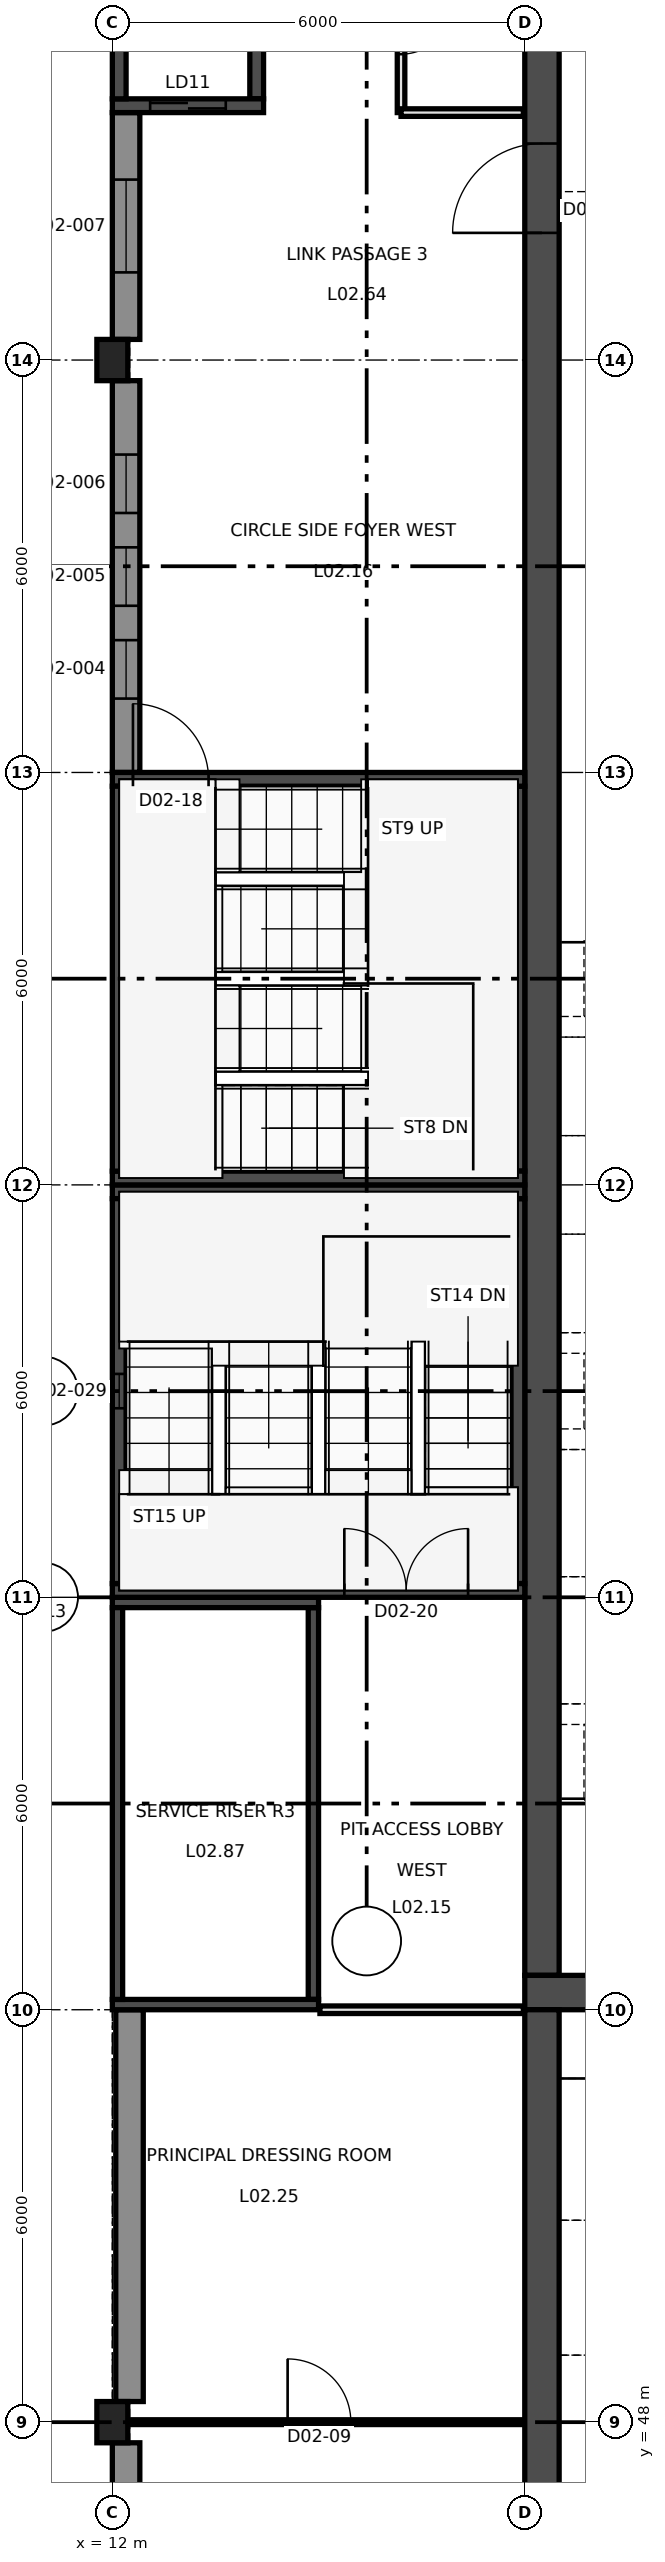
"""IFC4 building model, lengths in metres.
Left out: names, types, materials, properties, quantities, classifications, styles, units other than length and angle.
Written with IfcOpenShell. Run it as: python <this file> out.ifc"""

import sys

from ifc_helpers import new_model, si_unit, direction, frame, frame_2d, origin, origin_2d, place, context, subcontext, project, spatial, rectangle, extrude, element, fill, save


model = new_model("IFC4")
c1 = context("Model", 3, precision=1e-05, world=origin(), true_north=direction((0.0, 1.0)))
c2 = subcontext(c1, "Body", "Model", "MODEL_VIEW")
j1 = project(units=[si_unit("LENGTHUNIT", "METRE"), si_unit("PLANEANGLEUNIT", "RADIAN")], contexts=[c1])
p1 = place(None, origin())
s1 = spatial("IfcSite", under=j1, at=p1, CompositionType="ELEMENT")
p2 = place(p1, origin())
s2 = spatial("IfcBuilding", under=s1, at=p2, CompositionType="ELEMENT")
p3 = place(p2, frame((0.0, 0.0, 12.0)))
s3 = spatial("IfcBuildingStorey", under=s2, at=p3, CompositionType="ELEMENT", Elevation=12.0)
for number, where, z_axis, x_axis in (
    (1, (12.0, 48.0, 0.0), (0.0, 0.0, 1.0), (1.0, 0.0, 0.0)),
    (2, (12.0, 78.0, 0.0), (0.0, 0.0, 1.0), (1.0, 0.0, 0.0)),
):
    element("IfcColumn", number, at=place(p3, frame(where, z_axis=z_axis, x_axis=x_axis)), inside=s3, PredefinedType="COLUMN", context=c2, shape_type="SweptSolid", body=[
        extrude(rectangle(XDim=0.45, YDim=0.6, at=origin_2d()), origin(), (0.0, 0.0, 1.0), 4.5),
    ])
p4 = place(p3, frame((12.0, 71.9, 0.0), z_axis=(0.0, 0.0, 1.0), x_axis=(1.0, 0.0, 0.0)))
e3 = element("IfcWall", 3, at=p4, inside=s3, PredefinedType="SHEAR", context=c2, shape_type="SweptSolid", body=[
    extrude(rectangle(XDim=6.0, YDim=0.2, at=frame_2d((3.0, 0.0))), origin(), (0.0, 0.0, 1.0), 4.5),
])
p5 = place(p4, frame((0.3, 0.0, 0.0)))
e4 = element("IfcOpeningElement", 4, at=p5, cuts=e3, PredefinedType="OPENING", context=c2, shape_type="SweptSolid", body=[
    extrude(rectangle(XDim=1.1, YDim=2.2, at=frame_2d((0.55, 1.1))), frame((0.0, 0.11, 0.0), z_axis=(0.0, -1.0, 0.0), x_axis=(1.0, 0.0, 0.0)), (0.0, 0.0, 1.0), 0.22),
])
p6 = place(p3, frame((12.0, 66.1, 0.0), z_axis=(0.0, 0.0, 1.0), x_axis=(1.0, 0.0, 0.0)))
e5 = element("IfcWall", 5, at=p6, inside=s3, PredefinedType="SHEAR", context=c2, shape_type="SweptSolid", body=[
    extrude(rectangle(XDim=6.0, YDim=0.2, at=frame_2d((3.0, 0.0))), origin(), (0.0, 0.0, 1.0), 4.5),
])
for number, where, z_axis, x_axis in (
    (6, (12.1, 66.2, 0.0), (0.0, 0.0, 1.0), (0.0, 1.0, 0.0)),
    (7, (17.9, 66.2, 0.0), (0.0, 0.0, 1.0), (0.0, 1.0, 0.0)),
):
    element("IfcWall", number, at=place(p3, frame(where, z_axis=z_axis, x_axis=x_axis)), inside=s3, PredefinedType="SHEAR", context=c2, shape_type="SweptSolid", body=[
        extrude(rectangle(XDim=5.6, YDim=0.2, at=frame_2d((2.8, 0.0))), origin(), (0.0, 0.0, 1.0), 4.5),
    ])
p7 = place(p3, frame((12.0, 65.9, 0.0), z_axis=(0.0, 0.0, 1.0), x_axis=(1.0, 0.0, 0.0)))
e8 = element("IfcWall", 8, at=p7, inside=s3, PredefinedType="SHEAR", context=c2, shape_type="SweptSolid", body=[
    extrude(rectangle(XDim=6.0, YDim=0.2, at=frame_2d((3.0, 0.0))), origin(), (0.0, 0.0, 1.0), 4.5),
])
p8 = place(p3, frame((12.0, 60.1, 0.0), z_axis=(0.0, 0.0, 1.0), x_axis=(1.0, 0.0, 0.0)))
e9 = element("IfcWall", 9, at=p8, inside=s3, PredefinedType="SHEAR", context=c2, shape_type="SweptSolid", body=[
    extrude(rectangle(XDim=6.0, YDim=0.2, at=frame_2d((3.0, 0.0))), origin(), (0.0, 0.0, 1.0), 4.5),
])
p9 = place(p8, frame((3.375, 0.0, 0.0)))
e10 = element("IfcOpeningElement", 10, at=p9, cuts=e9, PredefinedType="OPENING", context=c2, shape_type="SweptSolid", body=[
    extrude(rectangle(XDim=1.8, YDim=2.2, at=frame_2d((0.9, 1.1))), frame((0.0, 0.11, 0.0), z_axis=(0.0, -1.0, 0.0), x_axis=(1.0, 0.0, 0.0)), (0.0, 0.0, 1.0), 0.22),
])
p10 = place(p3, frame((12.1, 60.2, 0.0), z_axis=(0.0, 0.0, 1.0), x_axis=(0.0, 1.0, 0.0)))
e11 = element("IfcWall", 11, at=p10, inside=s3, PredefinedType="SHEAR", context=c2, shape_type="SweptSolid", body=[
    extrude(rectangle(XDim=5.6, YDim=0.2, at=frame_2d((2.8, 0.0))), origin(), (0.0, 0.0, 1.0), 4.5),
])
p11 = place(p10, frame((2.55, 0.0, 0.9)))
e12 = element("IfcOpeningElement", 12, at=p11, cuts=e11, PredefinedType="OPENING", context=c2, shape_type="SweptSolid", body=[
    extrude(rectangle(XDim=0.5, YDim=2.1, at=frame_2d((0.25, 1.05))), frame((0.0, 0.11, 0.0), z_axis=(0.0, -1.0, 0.0), x_axis=(1.0, 0.0, 0.0)), (0.0, 0.0, 1.0), 0.22),
])
p12 = place(p3, frame((17.9, 60.2, 0.0), z_axis=(0.0, 0.0, 1.0), x_axis=(0.0, 1.0, 0.0)))
e13 = element("IfcWall", 13, at=p12, inside=s3, PredefinedType="SHEAR", context=c2, shape_type="SweptSolid", body=[
    extrude(rectangle(XDim=5.6, YDim=0.2, at=frame_2d((2.8, 0.0))), origin(), (0.0, 0.0, 1.0), 4.5),
])
p13 = place(p3, frame((12.0, 81.7, 0.0), z_axis=(0.0, 0.0, 1.0), x_axis=(1.0, 0.0, 0.0)))
e14 = element("IfcWall", 14, at=p13, inside=s3, PredefinedType="SHEAR", context=c2, shape_type="SweptSolid", body=[
    extrude(rectangle(XDim=2.2, YDim=0.2, at=frame_2d((1.1, 0.0))), origin(), (0.0, 0.0, 1.0), 4.5),
])
p14 = place(p13, frame((0.55, 0.0, 0.0)))
e15 = element("IfcOpeningElement", 15, at=p14, cuts=e14, PredefinedType="OPENING", context=c2, shape_type="SweptSolid", body=[
    extrude(rectangle(XDim=1.1, YDim=2.1, at=frame_2d((0.55, 1.05))), frame((0.0, 0.11, 0.0), z_axis=(0.0, -1.0, 0.0), x_axis=(1.0, 0.0, 0.0)), (0.0, 0.0, 1.0), 0.22),
])
for number, where, z_axis, x_axis in (
    (16, (12.1, 81.8, 0.0), (0.0, 0.0, 1.0), (0.0, 1.0, 0.0)),
    (17, (14.1, 81.8, 0.0), (0.0, 0.0, 1.0), (0.0, 1.0, 0.0)),
):
    element("IfcWall", number, at=place(p3, frame(where, z_axis=z_axis, x_axis=x_axis)), inside=s3, PredefinedType="SHEAR", context=c2, shape_type="SweptSolid", body=[
        extrude(rectangle(XDim=2.0, YDim=0.2, at=frame_2d((1.0, 0.0))), origin(), (0.0, 0.0, 1.0), 4.5),
    ])
for number, where, z_axis, x_axis in (
    (18, (12.0, 59.925, 0.0), (0.0, 0.0, 1.0), (1.0, 0.0, 0.0)),
    (19, (12.0, 54.075, 0.0), (0.0, 0.0, 1.0), (1.0, 0.0, 0.0)),
):
    element("IfcWall", number, at=place(p3, frame(where, z_axis=z_axis, x_axis=x_axis)), inside=s3, PredefinedType="SHEAR", context=c2, shape_type="SweptSolid", body=[
        extrude(rectangle(XDim=3.0, YDim=0.15, at=frame_2d((1.5, 0.0))), origin(), (0.0, 0.0, 1.0), 4.5),
    ])
for number, where, z_axis, x_axis in (
    (20, (12.075, 54.15, 0.0), (0.0, 0.0, 1.0), (0.0, 1.0, 0.0)),
    (21, (14.925, 54.15, 0.0), (0.0, 0.0, 1.0), (0.0, 1.0, 0.0)),
):
    element("IfcWall", number, at=place(p3, frame(where, z_axis=z_axis, x_axis=x_axis)), inside=s3, PredefinedType="SHEAR", context=c2, shape_type="SweptSolid", body=[
        extrude(rectangle(XDim=5.7, YDim=0.15, at=frame_2d((2.85, 0.0))), origin(), (0.0, 0.0, 1.0), 4.5),
    ])
p15 = place(p3, frame((18.25, 54.5, 0.0), z_axis=(0.0, 0.0, 1.0), x_axis=(0.0, 1.0, 0.0)))
e22 = element("IfcWall", 22, at=p15, inside=s3, PredefinedType="SHEAR", context=c2, shape_type="SweptSolid", body=[
    extrude(rectangle(XDim=35.5, YDim=0.5, at=frame_2d((17.75, 0.0))), origin(), (0.0, 0.0, 1.0), 4.5),
])
p16 = place(p15, frame((25.35, 0.0, 0.0)))
e23 = element("IfcOpeningElement", 23, at=p16, cuts=e22, PredefinedType="OPENING", context=c2, shape_type="SweptSolid", body=[
    extrude(rectangle(XDim=1.3, YDim=2.1, at=frame_2d((0.65, 1.05))), frame((0.0, 0.26, 0.0), z_axis=(0.0, -1.0, 0.0), x_axis=(1.0, 0.0, 0.0)), (0.0, 0.0, 1.0), 0.52),
])
p17 = place(p3, frame((18.25, 30.0, 0.0), z_axis=(0.0, 0.0, 1.0), x_axis=(0.0, 1.0, 0.0)))
e24 = element("IfcWall", 24, at=p17, inside=s3, PredefinedType="SHEAR", context=c2, shape_type="SweptSolid", body=[
    extrude(rectangle(XDim=24.0, YDim=0.5, at=frame_2d((12.0, 0.0))), origin(), (0.0, 0.0, 1.0), 4.5),
])
p18 = place(p3, frame((18.0, 54.25, 0.0), z_axis=(0.0, 0.0, 1.0), x_axis=(1.0, 0.0, 0.0)))
e25 = element("IfcWall", 25, at=p18, inside=s3, PredefinedType="SHEAR", context=c2, shape_type="SweptSolid", body=[
    extrude(rectangle(XDim=8.0, YDim=0.5, at=frame_2d((4.0, 0.0))), origin(), (0.0, 0.0, 1.0), 4.5),
])
p19 = place(p3, frame((12.2, 42.0, 0.0), z_axis=(0.0, 0.0, 1.0), x_axis=(0.0, 1.0, 0.0)))
e26 = element("IfcWall", 26, at=p19, inside=s3, PredefinedType="SOLIDWALL", context=c2, shape_type="SweptSolid", body=[
    extrude(rectangle(XDim=5.7, YDim=0.4, at=frame_2d((2.85, 0.0))), origin(), (0.0, 0.0, 1.0), 3.55),
])
p20 = place(p19, frame((1.075, 0.0, 0.9)))
e27 = element("IfcOpeningElement", 27, at=p20, cuts=e26, PredefinedType="OPENING", context=c2, shape_type="SweptSolid", body=[
    extrude(rectangle(XDim=0.85, YDim=2.45, at=frame_2d((0.425, 1.225))), frame((0.0, 0.21, 0.0), z_axis=(0.0, -1.0, 0.0), x_axis=(1.0, 0.0, 0.0)), (0.0, 0.0, 1.0), 0.42),
])
p21 = place(p19, frame((2.425, 0.0, 0.9)))
e28 = element("IfcOpeningElement", 28, at=p21, cuts=e26, PredefinedType="OPENING", context=c2, shape_type="SweptSolid", body=[
    extrude(rectangle(XDim=0.85, YDim=2.45, at=frame_2d((0.425, 1.225))), frame((0.0, 0.21, 0.0), z_axis=(0.0, -1.0, 0.0), x_axis=(1.0, 0.0, 0.0)), (0.0, 0.0, 1.0), 0.42),
])
p22 = place(p19, frame((3.775, 0.0, 0.9)))
e29 = element("IfcOpeningElement", 29, at=p22, cuts=e26, PredefinedType="OPENING", context=c2, shape_type="SweptSolid", body=[
    extrude(rectangle(XDim=0.85, YDim=2.45, at=frame_2d((0.425, 1.225))), frame((0.0, 0.21, 0.0), z_axis=(0.0, -1.0, 0.0), x_axis=(1.0, 0.0, 0.0)), (0.0, 0.0, 1.0), 0.42),
])
p23 = place(p3, frame((12.25, 48.3, 0.0), z_axis=(0.0, 0.0, 1.0), x_axis=(0.0, 1.0, 0.0)))
e30 = element("IfcWall", 30, at=p23, inside=s3, PredefinedType="SOLIDWALL", context=c2, shape_type="SweptSolid", body=[
    extrude(rectangle(XDim=5.7, YDim=0.4, at=frame_2d((2.85, 0.0))), origin(), (0.0, 0.0, 1.0), 3.55),
])
p24 = place(p3, frame((12.2, 72.0, 0.0), z_axis=(0.0, 0.0, 1.0), x_axis=(0.0, 1.0, 0.0)))
e31 = element("IfcWall", 31, at=p24, inside=s3, PredefinedType="SOLIDWALL", context=c2, shape_type="SweptSolid", body=[
    extrude(rectangle(XDim=5.7, YDim=0.4, at=frame_2d((2.85, 0.0))), origin(), (0.0, 0.0, 1.0), 3.55),
])
p25 = place(p24, frame((1.075, 0.0, 0.9)))
e32 = element("IfcOpeningElement", 32, at=p25, cuts=e31, PredefinedType="OPENING", context=c2, shape_type="SweptSolid", body=[
    extrude(rectangle(XDim=0.85, YDim=2.45, at=frame_2d((0.425, 1.225))), frame((0.0, 0.21, 0.0), z_axis=(0.0, -1.0, 0.0), x_axis=(1.0, 0.0, 0.0)), (0.0, 0.0, 1.0), 0.42),
])
p26 = place(p24, frame((2.425, 0.0, 0.9)))
e33 = element("IfcOpeningElement", 33, at=p26, cuts=e31, PredefinedType="OPENING", context=c2, shape_type="SweptSolid", body=[
    extrude(rectangle(XDim=0.85, YDim=2.45, at=frame_2d((0.425, 1.225))), frame((0.0, 0.21, 0.0), z_axis=(0.0, -1.0, 0.0), x_axis=(1.0, 0.0, 0.0)), (0.0, 0.0, 1.0), 0.42),
])
p27 = place(p24, frame((3.775, 0.0, 0.9)))
e34 = element("IfcOpeningElement", 34, at=p27, cuts=e31, PredefinedType="OPENING", context=c2, shape_type="SweptSolid", body=[
    extrude(rectangle(XDim=0.85, YDim=2.45, at=frame_2d((0.425, 1.225))), frame((0.0, 0.21, 0.0), z_axis=(0.0, -1.0, 0.0), x_axis=(1.0, 0.0, 0.0)), (0.0, 0.0, 1.0), 0.42),
])
p28 = place(p3, frame((12.2, 78.3, 0.0), z_axis=(0.0, 0.0, 1.0), x_axis=(0.0, 1.0, 0.0)))
e35 = element("IfcWall", 35, at=p28, inside=s3, PredefinedType="SOLIDWALL", context=c2, shape_type="SweptSolid", body=[
    extrude(rectangle(XDim=3.3, YDim=0.4, at=frame_2d((1.65, 0.0))), origin(), (0.0, 0.0, 1.0), 3.55),
])
p29 = place(p28, frame((0.975, 0.0, 0.9)))
e36 = element("IfcOpeningElement", 36, at=p29, cuts=e35, PredefinedType="OPENING", context=c2, shape_type="SweptSolid", body=[
    extrude(rectangle(XDim=1.35, YDim=2.45, at=frame_2d((0.675, 1.225))), frame((0.0, 0.21, 0.0), z_axis=(0.0, -1.0, 0.0), x_axis=(1.0, 0.0, 0.0)), (0.0, 0.0, 1.0), 0.42),
])
p30 = place(p3, frame((15.02, 54.0, 0.0), z_axis=(0.0, 0.0, 1.0), x_axis=(1.0, 0.0, 0.0)))
e37 = element("IfcWall", 37, at=p30, inside=s3, PredefinedType="PARTITIONING", context=c2, shape_type="SweptSolid", body=[
    extrude(rectangle(XDim=2.96, YDim=0.11, at=frame_2d((1.48, 0.0))), origin(), (0.0, 0.0, 1.0), 3.65),
])
p31 = place(p3, frame((16.2, 81.6, 0.0), z_axis=(0.0, 0.0, 1.0), x_axis=(0.0, 1.0, 0.0)))
e38 = element("IfcWall", 38, at=p31, inside=s3, PredefinedType="PARTITIONING", context=c2, shape_type="SweptSolid", body=[
    extrude(rectangle(XDim=2.4, YDim=0.11, at=frame_2d((1.2, 0.0))), origin(), (0.0, 0.0, 1.0), 3.65),
])
p32 = place(p31, frame((0.85, 0.0, 0.0)))
e39 = element("IfcOpeningElement", 39, at=p32, cuts=e38, PredefinedType="OPENING", context=c2, shape_type="SweptSolid", body=[
    extrude(rectangle(XDim=0.75, YDim=2.04, at=frame_2d((0.375, 1.02))), frame((0.0, 0.065, 0.0), z_axis=(0.0, -1.0, 0.0), x_axis=(1.0, 0.0, 0.0)), (0.0, 0.0, 1.0), 0.13),
])
p33 = place(p3, frame((16.2, 81.6, 0.0), z_axis=(0.0, 0.0, 1.0), x_axis=(1.0, 0.0, 0.0)))
e40 = element("IfcWall", 40, at=p33, inside=s3, PredefinedType="PARTITIONING", context=c2, shape_type="SweptSolid", body=[
    extrude(rectangle(XDim=1.78, YDim=0.11, at=frame_2d((0.89, 0.0))), origin(), (0.0, 0.0, 1.0), 4.25),
])
p34 = place(p3, frame((12.245, 48.0, 0.0), z_axis=(0.0, 0.0, 1.0), x_axis=(1.0, 0.0, 0.0)))
e41 = element("IfcWall", 41, at=p34, inside=s3, PredefinedType="PARTITIONING", context=c2, shape_type="SweptSolid", body=[
    extrude(rectangle(XDim=5.735, YDim=0.07, at=frame_2d((2.867, 0.0))), origin(), (0.0, 0.0, 1.0), 3.55),
])
p35 = place(p34, frame((2.305, 0.0, 0.0)))
e42 = element("IfcOpeningElement", 42, at=p35, cuts=e41, PredefinedType="OPENING", context=c2, shape_type="SweptSolid", body=[
    extrude(rectangle(XDim=0.92, YDim=2.04, at=frame_2d((0.46, 1.02))), frame((0.0, 0.045, 0.0), z_axis=(0.0, -1.0, 0.0), x_axis=(1.0, 0.0, 0.0)), (0.0, 0.0, 1.0), 0.09),
])
p36 = place(p25, origin())
e43 = element("IfcWindow", 43, at=p36, inside=s3, PartitioningType="SINGLE_PANEL", PredefinedType="WINDOW", context=c2, shape_type="SweptSolid", body=[
    extrude(rectangle(XDim=0.85, YDim=2.45, at=frame_2d((0.425, 1.225))), frame((0.0, 0.03, 0.0), z_axis=(0.0, -1.0, 0.0), x_axis=(1.0, 0.0, 0.0)), (0.0, 0.0, 1.0), 0.06),
])
fill(e32, e43)
p37 = place(p26, origin())
e44 = element("IfcWindow", 44, at=p37, inside=s3, PartitioningType="SINGLE_PANEL", PredefinedType="WINDOW", context=c2, shape_type="SweptSolid", body=[
    extrude(rectangle(XDim=0.85, YDim=2.45, at=frame_2d((0.425, 1.225))), frame((0.0, 0.03, 0.0), z_axis=(0.0, -1.0, 0.0), x_axis=(1.0, 0.0, 0.0)), (0.0, 0.0, 1.0), 0.06),
])
fill(e33, e44)
p38 = place(p27, origin())
e45 = element("IfcWindow", 45, at=p38, inside=s3, PartitioningType="SINGLE_PANEL", PredefinedType="WINDOW", context=c2, shape_type="SweptSolid", body=[
    extrude(rectangle(XDim=0.85, YDim=2.45, at=frame_2d((0.425, 1.225))), frame((0.0, 0.03, 0.0), z_axis=(0.0, -1.0, 0.0), x_axis=(1.0, 0.0, 0.0)), (0.0, 0.0, 1.0), 0.06),
])
fill(e34, e45)
p39 = place(p29, origin())
e46 = element("IfcWindow", 46, at=p39, inside=s3, PartitioningType="SINGLE_PANEL", PredefinedType="WINDOW", context=c2, shape_type="SweptSolid", body=[
    extrude(rectangle(XDim=1.35, YDim=2.45, at=frame_2d((0.675, 1.225))), frame((0.0, 0.03, 0.0), z_axis=(0.0, -1.0, 0.0), x_axis=(1.0, 0.0, 0.0)), (0.0, 0.0, 1.0), 0.06),
])
fill(e36, e46)
p40 = place(p11, origin())
e47 = element("IfcWindow", 47, at=p40, inside=s3, PartitioningType="SINGLE_PANEL", PredefinedType="WINDOW", context=c2, shape_type="SweptSolid", body=[
    extrude(rectangle(XDim=0.5, YDim=2.1, at=frame_2d((0.25, 1.05))), frame((0.0, 0.03, 0.0), z_axis=(0.0, -1.0, 0.0), x_axis=(1.0, 0.0, 0.0)), (0.0, 0.0, 1.0), 0.06),
])
fill(e12, e47)
p41 = place(p35, origin())
e48 = element("IfcDoor", 48, at=p41, inside=s3, OperationType="SINGLE_SWING_LEFT", PredefinedType="DOOR", context=c2, shape_type="SweptSolid", body=[
    extrude(rectangle(XDim=0.92, YDim=2.04, at=frame_2d((0.46, 1.02))), frame((0.0, 0.025, 0.0), z_axis=(0.0, -1.0, 0.0), x_axis=(1.0, 0.0, 0.0)), (0.0, 0.0, 1.0), 0.05),
])
fill(e42, e48)
p42 = place(p5, frame((1.1, 0.0, 0.0), z_axis=(0.0, 0.0, 1.0), x_axis=(-1.0, 0.0, 0.0)))
e49 = element("IfcDoor", 49, at=p42, inside=s3, OperationType="SINGLE_SWING_LEFT", PredefinedType="DOOR", context=c2, shape_type="SweptSolid", body=[
    extrude(rectangle(XDim=1.1, YDim=2.2, at=frame_2d((0.55, 1.1))), frame((0.0, 0.025, 0.0), z_axis=(0.0, -1.0, 0.0), x_axis=(1.0, 0.0, 0.0)), (0.0, 0.0, 1.0), 0.05),
])
fill(e4, e49)
p43 = place(p9, origin())
e50 = element("IfcDoor", 50, at=p43, inside=s3, OperationType="DOUBLE_DOOR_SINGLE_SWING", PredefinedType="DOOR", context=c2, shape_type="SweptSolid", body=[
    extrude(rectangle(XDim=1.8, YDim=2.2, at=frame_2d((0.9, 1.1))), frame((0.0, 0.025, 0.0), z_axis=(0.0, -1.0, 0.0), x_axis=(1.0, 0.0, 0.0)), (0.0, 0.0, 1.0), 0.05),
])
fill(e10, e50)
p44 = place(p32, frame((0.75, 0.0, 0.0), z_axis=(0.0, 0.0, 1.0), x_axis=(-1.0, 0.0, 0.0)))
e51 = element("IfcDoor", 51, at=p44, inside=s3, OperationType="SINGLE_SWING_RIGHT", PredefinedType="DOOR", context=c2, shape_type="SweptSolid", body=[
    extrude(rectangle(XDim=0.75, YDim=2.04, at=frame_2d((0.375, 1.02))), frame((0.0, 0.025, 0.0), z_axis=(0.0, -1.0, 0.0), x_axis=(1.0, 0.0, 0.0)), (0.0, 0.0, 1.0), 0.05),
])
fill(e39, e51)
p45 = place(p16, origin())
e52 = element("IfcDoor", 52, at=p45, inside=s3, OperationType="SINGLE_SWING_LEFT", PredefinedType="DOOR", context=c2, shape_type="SweptSolid", body=[
    extrude(rectangle(XDim=1.3, YDim=2.1, at=frame_2d((0.65, 1.05))), frame((0.0, 0.025, 0.0), z_axis=(0.0, -1.0, 0.0), x_axis=(1.0, 0.0, 0.0)), (0.0, 0.0, 1.0), 0.05),
])
fill(e23, e52)
p46 = place(p14, origin())
e53 = element("IfcDoor", 53, at=p46, inside=s3, OperationType="DOUBLE_DOOR_SLIDING", PredefinedType="DOOR", context=c2, shape_type="SweptSolid", body=[
    extrude(rectangle(XDim=1.1, YDim=2.1, at=frame_2d((0.55, 1.05))), frame((0.0, 0.025, 0.0), z_axis=(0.0, -1.0, 0.0), x_axis=(1.0, 0.0, 0.0)), (0.0, 0.0, 1.0), 0.05),
])
fill(e15, e53)
save(model, sys.argv[1])
